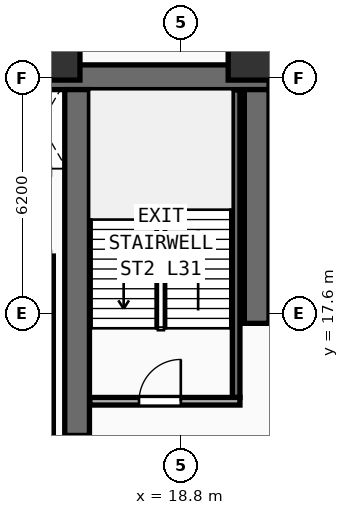
"""IFC4 building model, lengths in metres.
Left out: names, types, materials, properties, quantities, classifications, styles, units other than length and angle.
Written with IfcOpenShell. Run it as: python <this file> out.ifc"""

import sys

from ifc_helpers import new_model, si_unit, direction, frame, frame_2d, origin, origin_2d, place, context, subcontext, project, spatial, rectangle, extrude, element, fill, save


model = new_model("IFC4")
c1 = context("Model", 3, precision=1e-05, world=origin(), true_north=direction((0.0, 1.0)))
c2 = subcontext(c1, "Body", "Model", "MODEL_VIEW")
j1 = project(units=[si_unit("LENGTHUNIT", "METRE"), si_unit("PLANEANGLEUNIT", "RADIAN")], contexts=[c1])
p1 = place(None, origin())
s1 = spatial("IfcSite", under=j1, at=p1, CompositionType="ELEMENT")
p2 = place(p1, origin())
s2 = spatial("IfcBuilding", under=s1, at=p2, CompositionType="ELEMENT")
p3 = place(p2, frame((0.0, 0.0, 122.1)))
s3 = spatial("IfcBuildingStorey", under=s2, at=p3, CompositionType="ELEMENT", Elevation=122.1)
p4 = place(p3, frame((7.125, 23.825, 0.0), z_axis=(0.0, 0.0, 1.0), x_axis=(1.0, 0.0, 0.0)))
e1 = element("IfcWall", 1, at=p4, inside=s3, PredefinedType="SHEAR", context=c2, shape_type="SweptSolid", body=[
    extrude(rectangle(XDim=14.0, YDim=0.65, at=frame_2d((7.0, 0.0))), origin(), (0.0, 0.0, 1.0), 3.54),
])
p5 = place(p3, frame((20.8, 17.35, 0.0), z_axis=(0.0, 0.0, 1.0), x_axis=(0.0, 1.0, 0.0)))
e2 = element("IfcWall", 2, at=p5, inside=s3, PredefinedType="SHEAR", context=c2, shape_type="SweptSolid", body=[
    extrude(rectangle(XDim=6.15, YDim=0.65, at=frame_2d((3.075, 0.0))), origin(), (0.0, 0.0, 1.0), 3.54),
])
p6 = place(p3, frame((16.075, 14.4, 0.0), z_axis=(0.0, 0.0, 1.0), x_axis=(0.0, 1.0, 0.0)))
e3 = element("IfcWall", 3, at=p6, inside=s3, PredefinedType="SHEAR", context=c2, shape_type="SweptSolid", body=[
    extrude(rectangle(XDim=9.1, YDim=0.65, at=frame_2d((4.55, 0.0))), origin(), (0.0, 0.0, 1.0), 3.54),
])
for number, where, z_axis, x_axis in (
    (4, (15.45, 24.45, 0.0), (0.0, 0.0, 1.0), (1.0, 0.0, 0.0)),
    (5, (20.75, 24.45, 0.0), (0.0, 0.0, 1.0), (1.0, 0.0, 0.0)),
):
    element("IfcColumn", number, at=place(p3, frame(where, z_axis=z_axis, x_axis=x_axis)), inside=s3, PredefinedType="COLUMN", context=c2, shape_type="SweptSolid", body=[
        extrude(rectangle(XDim=1.4, YDim=1.4, at=origin_2d()), origin(), (0.0, 0.0, 1.0), 3.54),
    ])
p7 = place(p3, frame((20.26, 15.4, 0.0), z_axis=(0.0, 0.0, 1.0), x_axis=(0.0, 1.0, 0.0)))
e6 = element("IfcWall", 6, at=p7, inside=s3, PredefinedType="SHEAR", context=c2, shape_type="SweptSolid", body=[
    extrude(rectangle(XDim=8.09, YDim=0.2, at=frame_2d((4.045, 0.0))), origin(), (0.0, 0.0, 1.0), 3.54),
])
p8 = place(p3, frame((16.41, 15.3, 0.0), z_axis=(0.0, 0.0, 1.0), x_axis=(1.0, 0.0, 0.0)))
e7 = element("IfcWall", 7, at=p8, inside=s3, PredefinedType="PARTITIONING", context=c2, shape_type="SweptSolid", body=[
    extrude(rectangle(XDim=3.95, YDim=0.2, at=frame_2d((1.975, 0.0))), origin(), (0.0, 0.0, 1.0), 3.54),
])
p9 = place(p8, frame((1.294, 0.0, 0.0)))
e8 = element("IfcOpeningElement", 8, at=p9, cuts=e7, PredefinedType="OPENING", context=c2, shape_type="SweptSolid", body=[
    extrude(rectangle(XDim=1.1, YDim=2.2, at=frame_2d((0.55, 1.1))), frame((0.0, 0.11, 0.0), z_axis=(0.0, -1.0, 0.0), x_axis=(1.0, 0.0, 0.0)), (0.0, 0.0, 1.0), 0.22),
])
p10 = place(p3, frame((15.35, 14.22, 0.0), z_axis=(0.0, 0.0, 1.0), x_axis=(0.0, 1.0, 0.0)))
e9 = element("IfcWall", 9, at=p10, inside=s3, PredefinedType="PARTITIONING", context=c2, shape_type="SweptSolid", body=[
    extrude(rectangle(XDim=2.23, YDim=0.2, at=frame_2d((1.115, 0.0))), origin(), (0.0, 0.0, 1.0), 3.54),
])
p11 = place(p3, frame((15.35, 16.45, 0.0), z_axis=(0.0, 0.0, 1.0), x_axis=(0.0, 1.0, 0.0)))
e10 = element("IfcWall", 10, at=p11, inside=s3, PredefinedType="PARTITIONING", context=c2, shape_type="SweptSolid", body=[
    extrude(rectangle(XDim=2.67, YDim=0.2, at=frame_2d((1.335, 0.0))), origin(), (0.0, 0.0, 1.0), 3.54),
])
p12 = place(p9, origin())
e11 = element("IfcDoor", 11, at=p12, inside=s3, OperationType="SINGLE_SWING_RIGHT", PredefinedType="DOOR", context=c2, shape_type="SweptSolid", body=[
    extrude(rectangle(XDim=1.1, YDim=2.2, at=frame_2d((0.55, 1.1))), frame((0.0, 0.025, 0.0), z_axis=(0.0, -1.0, 0.0), x_axis=(1.0, 0.0, 0.0)), (0.0, 0.0, 1.0), 0.05),
])
fill(e8, e11)
save(model, sys.argv[1])
